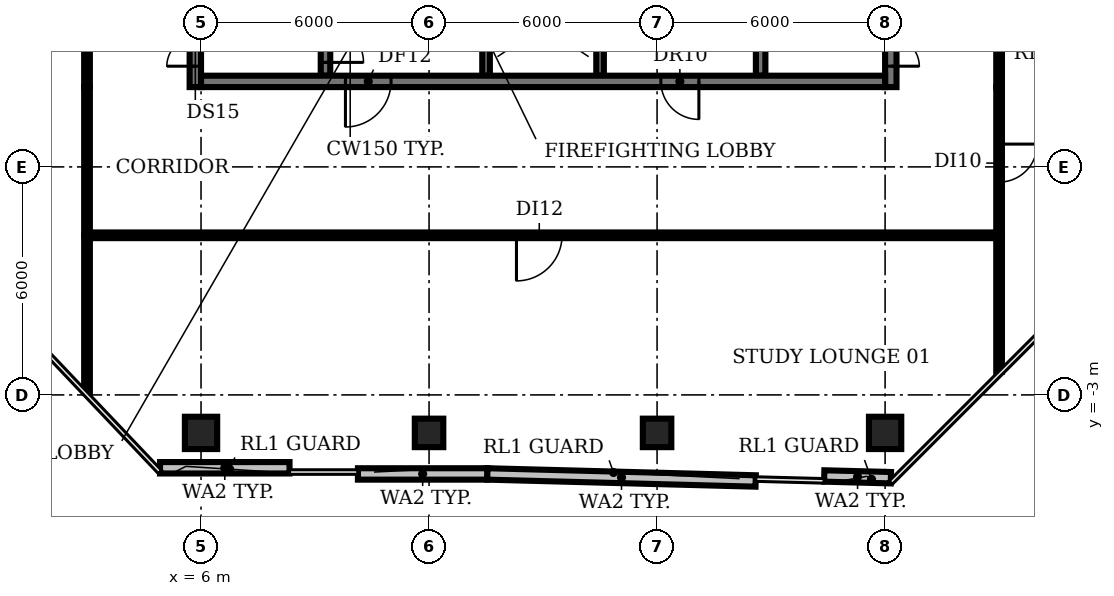
"""IFC4 building model, lengths in metres.
Left out: names, types, materials, properties, quantities, classifications, styles, units other than length and angle.
Written with IfcOpenShell. Run it as: python <this file> out.ifc"""

import sys

from ifc_helpers import new_model, si_unit, direction, frame, frame_2d, origin, origin_2d, place, context, subcontext, project, spatial, rectangle, circle, extrude, element, fill, save


model = new_model("IFC4")
c1 = context("Model", 3, precision=1e-05, world=origin(), true_north=direction((0.0, 1.0)))
c2 = subcontext(c1, "Body", "Model", "MODEL_VIEW")
j1 = project(units=[si_unit("LENGTHUNIT", "METRE"), si_unit("PLANEANGLEUNIT", "RADIAN")], contexts=[c1])
p1 = place(None, origin())
s1 = spatial("IfcSite", under=j1, at=p1, CompositionType="ELEMENT")
p2 = place(p1, origin())
s2 = spatial("IfcBuilding", under=s1, at=p2, CompositionType="ELEMENT")
p3 = place(p2, frame((0.0, 0.0, 281.0)))
s3 = spatial("IfcBuildingStorey", under=s2, at=p3, CompositionType="ELEMENT", Elevation=281.0)
p4 = place(p3, frame((6.0, -4.0, 0.0), z_axis=(0.0, 0.0, 1.0), x_axis=(1.0, 0.0, 0.0)))
e1 = element("IfcColumn", 1, at=p4, inside=s3, PredefinedType="COLUMN", context=c2, shape_type="SweptSolid", body=[
    extrude(circle(Radius=0.425, at=origin_2d()), origin(), (0.0, 0.0, 1.0), 3.85),
])
for number, where, z_axis, x_axis in (
    (2, (12.0, -4.0, 0.0), (0.0, 0.0, 1.0), (1.0, 0.0, 0.0)),
    (3, (18.0, -4.0, 0.0), (0.0, 0.0, 1.0), (1.0, 0.0, 0.0)),
):
    element("IfcColumn", number, at=place(p3, frame(where, z_axis=z_axis, x_axis=x_axis)), inside=s3, PredefinedType="COLUMN", context=c2, shape_type="SweptSolid", body=[
        extrude(rectangle(XDim=0.75, YDim=0.75, at=origin_2d()), origin(), (0.0, 0.0, 1.0), 3.85),
    ])
p5 = place(p3, frame((24.0, -4.0, 0.0), z_axis=(0.0, 0.0, 1.0), x_axis=(1.0, 0.0, 0.0)))
e4 = element("IfcColumn", 4, at=p5, inside=s3, PredefinedType="COLUMN", context=c2, shape_type="SweptSolid", body=[
    extrude(circle(Radius=0.425, at=origin_2d()), origin(), (0.0, 0.0, 1.0), 3.85),
])
p6 = place(p3, frame((4.921, -4.917, 0.0), z_axis=(0.0, 0.0, 1.0), x_axis=(1.0, 0.0, 0.0)))
e5 = element("IfcWall", 5, at=p6, inside=s3, PredefinedType="SOLIDWALL", context=c2, shape_type="SweptSolid", body=[
    extrude(rectangle(XDim=3.407, YDim=0.3, at=frame_2d((1.704, 0.0))), origin(), (0.0, 0.0, 1.0), 3.85),
])
p7 = place(p3, frame((10.128, -5.08, 0.0), z_axis=(0.0, 0.0, 1.0), x_axis=(1.0, 0.0, 0.0)))
e6 = element("IfcWall", 6, at=p7, inside=s3, PredefinedType="SOLIDWALL", context=c2, shape_type="SweptSolid", body=[
    extrude(rectangle(XDim=3.407, YDim=0.3, at=frame_2d((1.704, 0.0))), origin(), (0.0, 0.0, 1.0), 3.85),
])
p8 = place(p3, frame((13.534, -5.08, 0.0), z_axis=(0.0, 0.0, 1.0), x_axis=(0.999657569766, -0.026167598475, 0.0)))
e7 = element("IfcWall", 7, at=p8, inside=s3, PredefinedType="SOLIDWALL", context=c2, shape_type="SweptSolid", body=[
    extrude(rectangle(XDim=7.063, YDim=0.3, at=frame_2d((3.531, 0.0))), origin(), (0.0, 0.0, 1.0), 3.85),
])
p9 = place(p3, frame((22.398, -5.133, 0.0), z_axis=(0.0, 0.0, 1.0), x_axis=(0.999657665307, -0.026163948361, 0.0)))
e8 = element("IfcWall", 8, at=p9, inside=s3, PredefinedType="SOLIDWALL", context=c2, shape_type="SweptSolid", body=[
    extrude(rectangle(XDim=1.754, YDim=0.3, at=frame_2d((0.877, 0.0))), origin(), (0.0, 0.0, 1.0), 3.85),
])
p10 = place(p3, frame((9.275, 11.825, 0.0), z_axis=(0.0, 0.0, 1.0), x_axis=(0.0, -1.0, 0.0)))
e9 = element("IfcWall", 9, at=p10, inside=s3, PredefinedType="SHEAR", context=c2, shape_type="SweptSolid", body=[
    extrude(rectangle(XDim=6.425, YDim=0.25, at=frame_2d((3.212, 0.0))), origin(), (0.0, 0.0, 1.0), 3.85),
])
p11 = place(p10, frame((5.075, 0.0, 0.0)))
e10 = element("IfcOpeningElement", 10, at=p11, cuts=e9, PredefinedType="OPENING", context=c2, shape_type="SweptSolid", body=[
    extrude(rectangle(XDim=1.0, YDim=2.1, at=frame_2d((0.5, 1.05))), frame((0.0, 0.135, 0.0), z_axis=(0.0, -1.0, 0.0), x_axis=(1.0, 0.0, 0.0)), (0.0, 0.0, 1.0), 0.27),
])
p12 = place(p3, frame((13.5, 5.4, 0.0), z_axis=(0.0, 0.0, 1.0), x_axis=(0.0, 1.0, 0.0)))
e11 = element("IfcWall", 11, at=p12, inside=s3, PredefinedType="SHEAR", context=c2, shape_type="SweptSolid", body=[
    extrude(rectangle(XDim=8.2, YDim=0.2, at=frame_2d((4.1, 0.0))), origin(), (0.0, 0.0, 1.0), 3.85),
])
p13 = place(p12, frame((0.75, 0.0, 0.0)))
e12 = element("IfcOpeningElement", 12, at=p13, cuts=e11, PredefinedType="OPENING", context=c2, shape_type="SweptSolid", body=[
    extrude(rectangle(XDim=1.1, YDim=2.1, at=frame_2d((0.55, 1.05))), frame((0.0, 0.11, 0.0), z_axis=(0.0, -1.0, 0.0), x_axis=(1.0, 0.0, 0.0)), (0.0, 0.0, 1.0), 0.22),
])
p14 = place(p12, frame((3.55, 0.0, 0.0)))
e13 = element("IfcOpeningElement", 13, at=p14, cuts=e11, PredefinedType="OPENING", context=c2, shape_type="SweptSolid", body=[
    extrude(rectangle(XDim=1.1, YDim=2.1, at=frame_2d((0.55, 1.05))), frame((0.0, 0.11, 0.0), z_axis=(0.0, -1.0, 0.0), x_axis=(1.0, 0.0, 0.0)), (0.0, 0.0, 1.0), 0.22),
])
p15 = place(p12, frame((6.35, 0.0, 0.0)))
e14 = element("IfcOpeningElement", 14, at=p15, cuts=e11, PredefinedType="OPENING", context=c2, shape_type="SweptSolid", body=[
    extrude(rectangle(XDim=1.1, YDim=2.1, at=frame_2d((0.55, 1.05))), frame((0.0, 0.11, 0.0), z_axis=(0.0, -1.0, 0.0), x_axis=(1.0, 0.0, 0.0)), (0.0, 0.0, 1.0), 0.22),
])
p16 = place(p3, frame((16.5, 5.4, 0.0), z_axis=(0.0, 0.0, 1.0), x_axis=(0.0, 1.0, 0.0)))
e15 = element("IfcWall", 15, at=p16, inside=s3, PredefinedType="SHEAR", context=c2, shape_type="SweptSolid", body=[
    extrude(rectangle(XDim=8.2, YDim=0.2, at=frame_2d((4.1, 0.0))), origin(), (0.0, 0.0, 1.0), 3.85),
])
p17 = place(p3, frame((20.725, 5.4, 0.0), z_axis=(0.0, 0.0, 1.0), x_axis=(0.0, 1.0, 0.0)))
e16 = element("IfcWall", 16, at=p17, inside=s3, PredefinedType="SHEAR", context=c2, shape_type="SweptSolid", body=[
    extrude(rectangle(XDim=6.3, YDim=0.25, at=frame_2d((3.15, 0.0))), origin(), (0.0, 0.0, 1.0), 3.85),
])
p18 = place(p3, frame((5.85, 5.1, 0.0), z_axis=(0.0, 0.0, 1.0), x_axis=(0.0, 1.0, 0.0)))
e17 = element("IfcWall", 17, at=p18, inside=s3, PredefinedType="SHEAR", context=c2, shape_type="SweptSolid", body=[
    extrude(rectangle(XDim=20.0, YDim=0.3, at=frame_2d((10.0, 0.0))), origin(), (0.0, 0.0, 1.0), 3.85),
])
p19 = place(p18, frame((0.55, 0.0, 0.0)))
e18 = element("IfcOpeningElement", 18, at=p19, cuts=e17, PredefinedType="OPENING", context=c2, shape_type="SweptSolid", body=[
    extrude(rectangle(XDim=1.5, YDim=2.1, at=frame_2d((0.75, 1.05))), frame((0.0, 0.16, 0.0), z_axis=(0.0, -1.0, 0.0), x_axis=(1.0, 0.0, 0.0)), (0.0, 0.0, 1.0), 0.32),
])
p20 = place(p18, frame((7.0, 0.0, 0.0)))
e19 = element("IfcOpeningElement", 19, at=p20, cuts=e17, PredefinedType="OPENING", context=c2, shape_type="SweptSolid", body=[
    extrude(rectangle(XDim=1.2, YDim=2.1, at=frame_2d((0.6, 1.05))), frame((0.0, 0.16, 0.0), z_axis=(0.0, -1.0, 0.0), x_axis=(1.0, 0.0, 0.0)), (0.0, 0.0, 1.0), 0.32),
])
p21 = place(p18, frame((13.55, 0.0, 0.0)))
e20 = element("IfcOpeningElement", 20, at=p21, cuts=e17, PredefinedType="OPENING", context=c2, shape_type="SweptSolid", body=[
    extrude(rectangle(XDim=1.2, YDim=2.1, at=frame_2d((0.6, 1.05))), frame((0.0, 0.16, 0.0), z_axis=(0.0, -1.0, 0.0), x_axis=(1.0, 0.0, 0.0)), (0.0, 0.0, 1.0), 0.32),
])
p22 = place(p3, frame((24.15, 25.655, 0.0), z_axis=(0.0, 0.0, 1.0), x_axis=(0.0, -1.0, 0.0)))
e21 = element("IfcWall", 21, at=p22, inside=s3, PredefinedType="SHEAR", context=c2, shape_type="SweptSolid", body=[
    extrude(rectangle(XDim=20.555, YDim=0.3, at=frame_2d((10.277, 0.0))), origin(), (0.0, 0.0, 1.0), 3.85),
])
p23 = place(p22, frame((18.505, 0.0, 0.0)))
e22 = element("IfcOpeningElement", 22, at=p23, cuts=e21, PredefinedType="OPENING", context=c2, shape_type="SweptSolid", body=[
    extrude(rectangle(XDim=1.5, YDim=2.1, at=frame_2d((0.75, 1.05))), frame((0.0, 0.16, 0.0), z_axis=(0.0, -1.0, 0.0), x_axis=(1.0, 0.0, 0.0)), (0.0, 0.0, 1.0), 0.32),
])
p24 = place(p22, frame((12.405, 0.0, 0.0)))
e23 = element("IfcOpeningElement", 23, at=p24, cuts=e21, PredefinedType="OPENING", context=c2, shape_type="SweptSolid", body=[
    extrude(rectangle(XDim=0.9, YDim=2.1, at=frame_2d((0.45, 1.05))), frame((0.0, 0.16, 0.0), z_axis=(0.0, -1.0, 0.0), x_axis=(1.0, 0.0, 0.0)), (0.0, 0.0, 1.0), 0.32),
])
p25 = place(p22, frame((6.405, 0.0, 0.0)))
e24 = element("IfcOpeningElement", 24, at=p25, cuts=e21, PredefinedType="OPENING", context=c2, shape_type="SweptSolid", body=[
    extrude(rectangle(XDim=2.0, YDim=2.1, at=frame_2d((1.0, 1.05))), frame((0.0, 0.16, 0.0), z_axis=(0.0, -1.0, 0.0), x_axis=(1.0, 0.0, 0.0)), (0.0, 0.0, 1.0), 0.32),
])
p26 = place(p3, frame((24.0, 5.25, 0.0), z_axis=(0.0, 0.0, 1.0), x_axis=(-1.0, 0.0, 0.0)))
e25 = element("IfcWall", 25, at=p26, inside=s3, PredefinedType="SHEAR", context=c2, shape_type="SweptSolid", body=[
    extrude(rectangle(XDim=18.0, YDim=0.3, at=frame_2d((9.0, 0.0))), origin(), (0.0, 0.0, 1.0), 3.85),
])
p27 = place(p26, frame((13.0, 0.0, 0.0)))
e26 = element("IfcOpeningElement", 26, at=p27, cuts=e25, PredefinedType="OPENING", context=c2, shape_type="SweptSolid", body=[
    extrude(rectangle(XDim=1.2, YDim=2.1, at=frame_2d((0.6, 1.05))), frame((0.0, 0.16, 0.0), z_axis=(0.0, -1.0, 0.0), x_axis=(1.0, 0.0, 0.0)), (0.0, 0.0, 1.0), 0.32),
])
p28 = place(p26, frame((4.9, 0.0, 0.0)))
e27 = element("IfcOpeningElement", 27, at=p28, cuts=e25, PredefinedType="OPENING", context=c2, shape_type="SweptSolid", body=[
    extrude(rectangle(XDim=1.0, YDim=2.1, at=frame_2d((0.5, 1.05))), frame((0.0, 0.16, 0.0), z_axis=(0.0, -1.0, 0.0), x_axis=(1.0, 0.0, 0.0)), (0.0, 0.0, 1.0), 0.32),
])
p29 = place(p3, frame((3.0, -2.93, 0.0), z_axis=(0.0, 0.0, 1.0), x_axis=(0.0, 1.0, 0.0)))
e28 = element("IfcWall", 28, at=p29, inside=s3, PredefinedType="PARTITIONING", context=c2, shape_type="SweptSolid", body=[
    extrude(rectangle(XDim=4.13, YDim=0.15, at=frame_2d((2.065, 0.0))), origin(), (0.0, 0.0, 1.0), 2.9),
])
p30 = place(p3, frame((3.0, 1.2, 0.0), z_axis=(0.0, 0.0, 1.0), x_axis=(0.0, 1.0, 0.0)))
e29 = element("IfcWall", 29, at=p30, inside=s3, PredefinedType="PARTITIONING", context=c2, shape_type="SweptSolid", body=[
    extrude(rectangle(XDim=3.9, YDim=0.15, at=frame_2d((1.95, 0.0))), origin(), (0.0, 0.0, 1.0), 2.9),
])
p31 = place(p3, frame((3.0, 5.1, 0.0), z_axis=(0.0, 0.0, 1.0), x_axis=(0.0, 1.0, 0.0)))
e30 = element("IfcWall", 30, at=p31, inside=s3, PredefinedType="PARTITIONING", context=c2, shape_type="SweptSolid", body=[
    extrude(rectangle(XDim=20.0, YDim=0.15, at=frame_2d((10.0, 0.0))), origin(), (0.0, 0.0, 1.0), 2.9),
])
p32 = place(p31, frame((9.3, 0.0, 0.0)))
e31 = element("IfcOpeningElement", 31, at=p32, cuts=e30, PredefinedType="OPENING", context=c2, shape_type="SweptSolid", body=[
    extrude(rectangle(XDim=1.2, YDim=2.1, at=frame_2d((0.6, 1.05))), frame((0.0, 0.085, 0.0), z_axis=(0.0, -1.0, 0.0), x_axis=(1.0, 0.0, 0.0)), (0.0, 0.0, 1.0), 0.17),
])
p33 = place(p3, frame((27.0, -2.39, 0.0), z_axis=(0.0, 0.0, 1.0), x_axis=(0.0, 1.0, 0.0)))
e32 = element("IfcWall", 32, at=p33, inside=s3, PredefinedType="PARTITIONING", context=c2, shape_type="SweptSolid", body=[
    extrude(rectangle(XDim=3.59, YDim=0.15, at=frame_2d((1.795, 0.0))), origin(), (0.0, 0.0, 1.0), 2.9),
])
p34 = place(p3, frame((27.0, 1.2, 0.0), z_axis=(0.0, 0.0, 1.0), x_axis=(-1.0, 0.0, 0.0)))
e33 = element("IfcWall", 33, at=p34, inside=s3, PredefinedType="PARTITIONING", context=c2, shape_type="SweptSolid", body=[
    extrude(rectangle(XDim=24.0, YDim=0.15, at=frame_2d((12.0, 0.0))), origin(), (0.0, 0.0, 1.0), 2.9),
])
p35 = place(p34, frame((11.5, 0.0, 0.0)))
e34 = element("IfcOpeningElement", 34, at=p35, cuts=e33, PredefinedType="OPENING", context=c2, shape_type="SweptSolid", body=[
    extrude(rectangle(XDim=1.2, YDim=2.1, at=frame_2d((0.6, 1.05))), frame((0.0, 0.085, 0.0), z_axis=(0.0, -1.0, 0.0), x_axis=(1.0, 0.0, 0.0)), (0.0, 0.0, 1.0), 0.17),
])
p36 = place(p3, frame((27.0, 5.1, 0.0), z_axis=(0.0, 0.0, 1.0), x_axis=(0.0, -1.0, 0.0)))
e35 = element("IfcWall", 35, at=p36, inside=s3, PredefinedType="PARTITIONING", context=c2, shape_type="SweptSolid", body=[
    extrude(rectangle(XDim=3.9, YDim=0.15, at=frame_2d((1.95, 0.0))), origin(), (0.0, 0.0, 1.0), 2.9),
])
p37 = place(p36, frame((1.5, 0.0, 0.0)))
e36 = element("IfcOpeningElement", 36, at=p37, cuts=e35, PredefinedType="OPENING", context=c2, shape_type="SweptSolid", body=[
    extrude(rectangle(XDim=1.0, YDim=2.1, at=frame_2d((0.5, 1.05))), frame((0.0, 0.085, 0.0), z_axis=(0.0, -1.0, 0.0), x_axis=(1.0, 0.0, 0.0)), (0.0, 0.0, 1.0), 0.17),
])
p38 = place(p3, frame((27.0, 5.1, 0.0), z_axis=(0.0, 0.0, 1.0), x_axis=(0.0, 1.0, 0.0)))
e37 = element("IfcWall", 37, at=p38, inside=s3, PredefinedType="PARTITIONING", context=c2, shape_type="SweptSolid", body=[
    extrude(rectangle(XDim=3.75, YDim=0.15, at=frame_2d((1.875, 0.0))), origin(), (0.0, 0.0, 1.0), 2.9),
])
p39 = place(p11, origin())
e38 = element("IfcDoor", 38, at=p39, inside=s3, OperationType="SINGLE_SWING_RIGHT", PredefinedType="DOOR", context=c2, shape_type="SweptSolid", body=[
    extrude(rectangle(XDim=1.0, YDim=2.1, at=frame_2d((0.5, 1.05))), frame((0.0, 0.025, 0.0), z_axis=(0.0, -1.0, 0.0), x_axis=(1.0, 0.0, 0.0)), (0.0, 0.0, 1.0), 0.05),
])
fill(e10, e38)
p40 = place(p19, origin())
e39 = element("IfcDoor", 39, at=p40, inside=s3, OperationType="DOUBLE_DOOR_SINGLE_SWING", PredefinedType="DOOR", context=c2, shape_type="SweptSolid", body=[
    extrude(rectangle(XDim=1.5, YDim=2.1, at=frame_2d((0.75, 1.05))), frame((0.0, 0.025, 0.0), z_axis=(0.0, -1.0, 0.0), x_axis=(1.0, 0.0, 0.0)), (0.0, 0.0, 1.0), 0.05),
])
fill(e18, e39)
p41 = place(p23, origin())
e40 = element("IfcDoor", 40, at=p41, inside=s3, OperationType="DOUBLE_DOOR_SINGLE_SWING", PredefinedType="DOOR", context=c2, shape_type="SweptSolid", body=[
    extrude(rectangle(XDim=1.5, YDim=2.1, at=frame_2d((0.75, 1.05))), frame((0.0, 0.025, 0.0), z_axis=(0.0, -1.0, 0.0), x_axis=(1.0, 0.0, 0.0)), (0.0, 0.0, 1.0), 0.05),
])
fill(e22, e40)
p42 = place(p27, origin())
e41 = element("IfcDoor", 41, at=p42, inside=s3, OperationType="SINGLE_SWING_RIGHT", PredefinedType="DOOR", context=c2, shape_type="SweptSolid", body=[
    extrude(rectangle(XDim=1.2, YDim=2.1, at=frame_2d((0.6, 1.05))), frame((0.0, 0.025, 0.0), z_axis=(0.0, -1.0, 0.0), x_axis=(1.0, 0.0, 0.0)), (0.0, 0.0, 1.0), 0.05),
])
fill(e26, e41)
p43 = place(p28, origin())
e42 = element("IfcDoor", 42, at=p43, inside=s3, OperationType="SINGLE_SWING_LEFT", PredefinedType="DOOR", context=c2, shape_type="SweptSolid", body=[
    extrude(rectangle(XDim=1.0, YDim=2.1, at=frame_2d((0.5, 1.05))), frame((0.0, 0.025, 0.0), z_axis=(0.0, -1.0, 0.0), x_axis=(1.0, 0.0, 0.0)), (0.0, 0.0, 1.0), 0.05),
])
fill(e27, e42)
p44 = place(p35, origin())
e43 = element("IfcDoor", 43, at=p44, inside=s3, OperationType="SINGLE_SWING_RIGHT", PredefinedType="DOOR", context=c2, shape_type="SweptSolid", body=[
    extrude(rectangle(XDim=1.2, YDim=2.1, at=frame_2d((0.6, 1.05))), frame((0.0, 0.025, 0.0), z_axis=(0.0, -1.0, 0.0), x_axis=(1.0, 0.0, 0.0)), (0.0, 0.0, 1.0), 0.05),
])
fill(e34, e43)
p45 = place(p37, origin())
e44 = element("IfcDoor", 44, at=p45, inside=s3, OperationType="SINGLE_SWING_LEFT", PredefinedType="DOOR", context=c2, shape_type="SweptSolid", body=[
    extrude(rectangle(XDim=1.0, YDim=2.1, at=frame_2d((0.5, 1.05))), frame((0.0, 0.025, 0.0), z_axis=(0.0, -1.0, 0.0), x_axis=(1.0, 0.0, 0.0)), (0.0, 0.0, 1.0), 0.05),
])
fill(e36, e44)
save(model, sys.argv[1])
